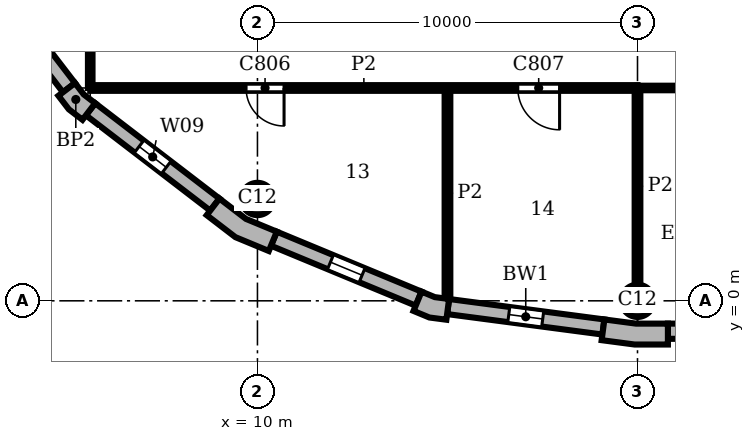
"""IFC4 building model, lengths in metres.
Left out: names, types, materials, properties, quantities, classifications, styles, units other than length and angle.
Written with IfcOpenShell. Run it as: python <this file> out.ifc"""

import sys

from ifc_helpers import new_model, si_unit, direction, frame, frame_2d, origin, origin_2d, place, context, subcontext, project, spatial, polyline, rectangle, circle, outline, extrude, element, fill, save


model = new_model("IFC4")
c1 = context("Model", 3, precision=1e-05, world=origin(), true_north=direction((0.0, 1.0)))
c2 = subcontext(c1, "Body", "Model", "MODEL_VIEW")
j1 = project(units=[si_unit("LENGTHUNIT", "METRE"), si_unit("PLANEANGLEUNIT", "RADIAN")], contexts=[c1])
p1 = place(None, origin())
s1 = spatial("IfcSite", under=j1, at=p1, CompositionType="ELEMENT")
p2 = place(p1, origin())
s2 = spatial("IfcBuilding", under=s1, at=p2, CompositionType="ELEMENT")
p3 = place(p2, frame((0.0, 0.0, 317.7)))
s3 = spatial("IfcBuildingStorey", under=s2, at=p3, CompositionType="ELEMENT", Elevation=317.7)
for number, where, z_axis, x_axis in (
    (1, (20.0, 0.0, 0.0), (0.0, 0.0, 1.0), (1.0, 0.0, 0.0)),
    (2, (10.0, 2.679, 0.0), (0.0, 0.0, 1.0), (1.0, 0.0, 0.0)),
):
    element("IfcColumn", number, at=place(p3, frame(where, z_axis=z_axis, x_axis=x_axis)), inside=s3, PredefinedType="COLUMN", context=c2, shape_type="SweptSolid", body=[
        extrude(circle(Radius=0.425, at=origin_2d()), origin(), (0.0, 0.0, 1.0), 3.9),
    ])
p4 = place(p3, origin())
e3 = element("IfcWall", 3, at=p4, inside=s3, PredefinedType="SOLIDWALL", context=c2, shape_type="SweptSolid", body=[
    extrude(outline(polyline([(19.076, -0.887), (19.057, -1.036), (19.925, -1.15), (20.8, -1.15), (20.8, -1.0), (20.8, -0.6), (19.961, -0.6), (19.128, -0.49), (19.076, -0.887)])), origin(), (0.0, 0.0, 1.0), 3.9),
])
e4 = element("IfcWall", 4, at=p4, inside=s3, PredefinedType="SOLIDWALL", context=c2, shape_type="SweptSolid", body=[
    extrude(outline(polyline([(4.882, 5.487), (4.763, 5.396), (5.038, 5.038), (5.396, 4.763), (5.487, 4.882), (5.731, 5.199), (5.43, 5.43), (5.199, 5.731), (4.882, 5.487)])), origin(), (0.0, 0.0, 1.0), 3.9),
])
e5 = element("IfcWall", 5, at=p4, inside=s3, PredefinedType="SOLIDWALL", context=c2, shape_type="SweptSolid", body=[
    extrude(outline(polyline([(8.757, 2.373), (8.665, 2.254), (9.42, 1.675), (10.299, 1.311), (10.356, 1.449), (10.51, 1.819), (9.698, 2.155), (9.0, 2.69), (8.757, 2.373)])), origin(), (0.0, 0.0, 1.0), 3.9),
])
e6 = element("IfcWall", 6, at=p4, inside=s3, PredefinedType="SOLIDWALL", context=c2, shape_type="SweptSolid", body=[
    extrude(outline(polyline([(14.164, -0.128), (14.106, -0.266), (14.523, -0.439), (14.971, -0.498), (14.99, -0.349), (15.043, 0.047), (14.667, 0.097), (14.317, 0.242), (14.164, -0.128)])), origin(), (0.0, 0.0, 1.0), 3.9),
])
p5 = place(p3, frame((20.8, -0.8, 0.0), z_axis=(0.0, 0.0, 1.0), x_axis=(1.0, 0.0, 0.0)))
e7 = element("IfcWall", 7, at=p5, inside=s3, PredefinedType="SOLIDWALL", context=c2, shape_type="SweptSolid", body=[
    extrude(rectangle(XDim=18.4, YDim=0.4, at=frame_2d((9.2, 0.0))), origin(), (0.0, 0.0, 1.0), 3.9),
])
p6 = place(p5, frame((3.75, 0.0, 0.9)))
e8 = element("IfcOpeningElement", 8, at=p6, cuts=e7, PredefinedType="OPENING", context=c2, shape_type="SweptSolid", body=[
    extrude(rectangle(XDim=0.9, YDim=2.35, at=frame_2d((0.45, 1.175))), frame((0.0, 0.21, 0.0), z_axis=(0.0, -1.0, 0.0), x_axis=(1.0, 0.0, 0.0)), (0.0, 0.0, 1.0), 0.42),
])
p7 = place(p5, frame((13.75, 0.0, 0.9)))
e9 = element("IfcOpeningElement", 9, at=p7, cuts=e7, PredefinedType="OPENING", context=c2, shape_type="SweptSolid", body=[
    extrude(rectangle(XDim=0.9, YDim=2.35, at=frame_2d((0.45, 1.175))), frame((0.0, 0.21, 0.0), z_axis=(0.0, -1.0, 0.0), x_axis=(1.0, 0.0, 0.0)), (0.0, 0.0, 1.0), 0.42),
])
p8 = place(p3, frame((2.532, 8.878, 0.0), z_axis=(0.0, 0.0, 1.0), x_axis=(0.608759824817, -0.793354571229, 0.0)))
e10 = element("IfcWall", 10, at=p8, inside=s3, PredefinedType="SOLIDWALL", context=c2, shape_type="SweptSolid", body=[
    extrude(rectangle(XDim=4.121, YDim=0.4, at=frame_2d((2.061, 0.0))), origin(), (0.0, 0.0, 1.0), 3.9),
])
p9 = place(p8, frame((1.611, 0.0, 0.9)))
e11 = element("IfcOpeningElement", 11, at=p9, cuts=e10, PredefinedType="OPENING", context=c2, shape_type="SweptSolid", body=[
    extrude(rectangle(XDim=0.9, YDim=2.35, at=frame_2d((0.45, 1.175))), frame((0.0, 0.21, 0.0), z_axis=(0.0, -1.0, 0.0), x_axis=(1.0, 0.0, 0.0)), (0.0, 0.0, 1.0), 0.42),
])
p10 = place(p3, frame((5.609, 5.041, 0.0), z_axis=(0.0, 0.0, 1.0), x_axis=(0.793354571229, -0.608759824817, 0.0)))
e12 = element("IfcWall", 12, at=p10, inside=s3, PredefinedType="SOLIDWALL", context=c2, shape_type="SweptSolid", body=[
    extrude(rectangle(XDim=4.121, YDim=0.4, at=frame_2d((2.061, 0.0))), origin(), (0.0, 0.0, 1.0), 3.9),
])
p11 = place(p10, frame((1.611, 0.0, 0.9)))
e13 = element("IfcOpeningElement", 13, at=p11, cuts=e12, PredefinedType="OPENING", context=c2, shape_type="SweptSolid", body=[
    extrude(rectangle(XDim=0.9, YDim=2.35, at=frame_2d((0.45, 1.175))), frame((0.0, 0.21, 0.0), z_axis=(0.0, -1.0, 0.0), x_axis=(1.0, 0.0, 0.0)), (0.0, 0.0, 1.0), 0.42),
])
p12 = place(p3, frame((10.433, 1.634, 0.0), z_axis=(0.0, 0.0, 1.0), x_axis=(0.923863744394, -0.382721546029, 0.0)))
e14 = element("IfcWall", 14, at=p12, inside=s3, PredefinedType="SOLIDWALL", context=c2, shape_type="SweptSolid", body=[
    extrude(rectangle(XDim=4.121, YDim=0.4, at=frame_2d((2.061, 0.0))), origin(), (0.0, 0.0, 1.0), 3.9),
])
p13 = place(p12, frame((1.611, 0.0, 0.9)))
e15 = element("IfcOpeningElement", 15, at=p13, cuts=e14, PredefinedType="OPENING", context=c2, shape_type="SweptSolid", body=[
    extrude(rectangle(XDim=0.9, YDim=2.35, at=frame_2d((0.45, 1.175))), frame((0.0, 0.21, 0.0), z_axis=(0.0, -1.0, 0.0), x_axis=(1.0, 0.0, 0.0)), (0.0, 0.0, 1.0), 0.42),
])
p14 = place(p3, frame((15.017, -0.151, 0.0), z_axis=(0.0, 0.0, 1.0), x_axis=(0.991446429508, -0.130514280502, 0.0)))
e16 = element("IfcWall", 16, at=p14, inside=s3, PredefinedType="SOLIDWALL", context=c2, shape_type="SweptSolid", body=[
    extrude(rectangle(XDim=4.121, YDim=0.4, at=frame_2d((2.061, 0.0))), origin(), (0.0, 0.0, 1.0), 3.9),
])
p15 = place(p14, frame((1.611, 0.0, 0.9)))
e17 = element("IfcOpeningElement", 17, at=p15, cuts=e16, PredefinedType="OPENING", context=c2, shape_type="SweptSolid", body=[
    extrude(rectangle(XDim=0.9, YDim=2.35, at=frame_2d((0.45, 1.175))), frame((0.0, 0.21, 0.0), z_axis=(0.0, -1.0, 0.0), x_axis=(1.0, 0.0, 0.0)), (0.0, 0.0, 1.0), 0.42),
])
p16 = place(p3, frame((15.0, 0.063, 0.0), z_axis=(0.0, 0.0, 1.0), x_axis=(0.0, 1.0, 0.0)))
e18 = element("IfcWall", 18, at=p16, inside=s3, PredefinedType="PARTITIONING", context=c2, shape_type="SweptSolid", body=[
    extrude(rectangle(XDim=5.537, YDim=0.15, at=frame_2d((2.769, 0.0))), origin(), (0.0, 0.0, 1.0), 3.58),
])
p17 = place(p3, frame((20.0, 0.425, 0.0), z_axis=(0.0, 0.0, 1.0), x_axis=(0.0, 1.0, 0.0)))
e19 = element("IfcWall", 19, at=p17, inside=s3, PredefinedType="PARTITIONING", context=c2, shape_type="SweptSolid", body=[
    extrude(rectangle(XDim=5.175, YDim=0.15, at=frame_2d((2.587, 0.0))), origin(), (0.0, 0.0, 1.0), 3.58),
])
p18 = place(p3, frame((5.6, 5.6, 0.0), z_axis=(0.0, 0.0, 1.0), x_axis=(1.0, 0.0, 0.0)))
e20 = element("IfcWall", 20, at=p18, inside=s3, PredefinedType="PARTITIONING", context=c2, shape_type="SweptSolid", body=[
    extrude(rectangle(XDim=14.4, YDim=0.15, at=frame_2d((7.2, 0.0))), origin(), (0.0, 0.0, 1.0), 3.58),
])
p19 = place(p18, frame((4.1, 0.0, 0.0)))
e21 = element("IfcOpeningElement", 21, at=p19, cuts=e20, PredefinedType="OPENING", context=c2, shape_type="SweptSolid", body=[
    extrude(rectangle(XDim=1.0, YDim=2.1, at=frame_2d((0.5, 1.05))), frame((0.0, 0.085, 0.0), z_axis=(0.0, -1.0, 0.0), x_axis=(1.0, 0.0, 0.0)), (0.0, 0.0, 1.0), 0.17),
])
p20 = place(p18, frame((11.25, 0.0, 0.0)))
e22 = element("IfcOpeningElement", 22, at=p20, cuts=e20, PredefinedType="OPENING", context=c2, shape_type="SweptSolid", body=[
    extrude(rectangle(XDim=1.1, YDim=2.1, at=frame_2d((0.55, 1.05))), frame((0.0, 0.085, 0.0), z_axis=(0.0, -1.0, 0.0), x_axis=(1.0, 0.0, 0.0)), (0.0, 0.0, 1.0), 0.17),
])
p21 = place(p3, frame((5.6, 5.6, 0.0), z_axis=(0.0, 0.0, 1.0), x_axis=(0.0, 1.0, 0.0)))
e23 = element("IfcWall", 23, at=p21, inside=s3, PredefinedType="PARTITIONING", context=c2, shape_type="SweptSolid", body=[
    extrude(rectangle(XDim=9.4, YDim=0.12, at=frame_2d((4.7, 0.0))), origin(), (0.0, 0.0, 1.0), 3.58),
])
p22 = place(p21, frame((4.35, 0.0, 0.0)))
e24 = element("IfcOpeningElement", 24, at=p22, cuts=e23, PredefinedType="OPENING", context=c2, shape_type="SweptSolid", body=[
    extrude(rectangle(XDim=1.0, YDim=2.1, at=frame_2d((0.5, 1.05))), frame((0.0, 0.07, 0.0), z_axis=(0.0, -1.0, 0.0), x_axis=(1.0, 0.0, 0.0)), (0.0, 0.0, 1.0), 0.14),
])
p23 = place(p3, frame((20.0, 5.6, 0.0), z_axis=(0.0, 0.0, 1.0), x_axis=(1.0, 0.0, 0.0)))
e25 = element("IfcWall", 25, at=p23, inside=s3, PredefinedType="PARTITIONING", context=c2, shape_type="SweptSolid", body=[
    extrude(rectangle(XDim=11.0, YDim=0.12, at=frame_2d((5.5, 0.0))), origin(), (0.0, 0.0, 1.0), 3.58),
])
p24 = place(p11, origin())
e26 = element("IfcWindow", 26, at=p24, inside=s3, PartitioningType="SINGLE_PANEL", PredefinedType="WINDOW", context=c2, shape_type="SweptSolid", body=[
    extrude(rectangle(XDim=0.9, YDim=2.35, at=frame_2d((0.45, 1.175))), frame((0.0, 0.16, 0.0), z_axis=(0.0, -1.0, 0.0), x_axis=(1.0, 0.0, 0.0)), (0.0, 0.0, 1.0), 0.06),
])
fill(e13, e26)
p25 = place(p13, origin())
e27 = element("IfcWindow", 27, at=p25, inside=s3, PartitioningType="SINGLE_PANEL", PredefinedType="WINDOW", context=c2, shape_type="SweptSolid", body=[
    extrude(rectangle(XDim=0.9, YDim=2.35, at=frame_2d((0.45, 1.175))), frame((0.0, 0.16, 0.0), z_axis=(0.0, -1.0, 0.0), x_axis=(1.0, 0.0, 0.0)), (0.0, 0.0, 1.0), 0.06),
])
fill(e15, e27)
p26 = place(p15, origin())
e28 = element("IfcWindow", 28, at=p26, inside=s3, PartitioningType="SINGLE_PANEL", PredefinedType="WINDOW", context=c2, shape_type="SweptSolid", body=[
    extrude(rectangle(XDim=0.9, YDim=2.35, at=frame_2d((0.45, 1.175))), frame((0.0, 0.16, 0.0), z_axis=(0.0, -1.0, 0.0), x_axis=(1.0, 0.0, 0.0)), (0.0, 0.0, 1.0), 0.06),
])
fill(e17, e28)
p27 = place(p19, frame((1.0, 0.0, 0.0), z_axis=(0.0, 0.0, 1.0), x_axis=(-1.0, 0.0, 0.0)))
e29 = element("IfcDoor", 29, at=p27, inside=s3, OperationType="SINGLE_SWING_LEFT", PredefinedType="DOOR", context=c2, shape_type="SweptSolid", body=[
    extrude(rectangle(XDim=1.0, YDim=2.1, at=frame_2d((0.5, 1.05))), frame((0.0, 0.025, 0.0), z_axis=(0.0, -1.0, 0.0), x_axis=(1.0, 0.0, 0.0)), (0.0, 0.0, 1.0), 0.05),
])
fill(e21, e29)
p28 = place(p20, frame((1.1, 0.0, 0.0), z_axis=(0.0, 0.0, 1.0), x_axis=(-1.0, 0.0, 0.0)))
e30 = element("IfcDoor", 30, at=p28, inside=s3, OperationType="SINGLE_SWING_LEFT", PredefinedType="DOOR", context=c2, shape_type="SweptSolid", body=[
    extrude(rectangle(XDim=1.1, YDim=2.1, at=frame_2d((0.55, 1.05))), frame((0.0, 0.025, 0.0), z_axis=(0.0, -1.0, 0.0), x_axis=(1.0, 0.0, 0.0)), (0.0, 0.0, 1.0), 0.05),
])
fill(e22, e30)
save(model, sys.argv[1])
